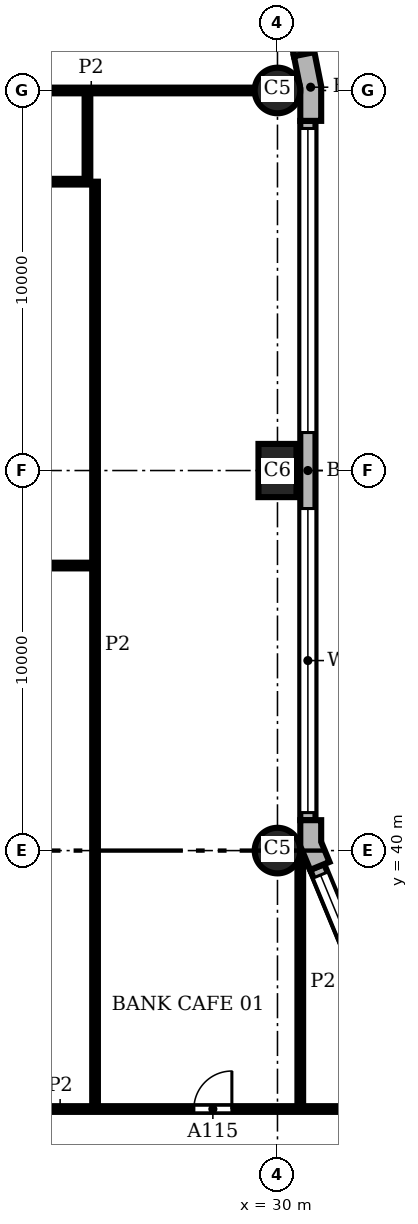
"""IFC4 building model, lengths in metres.
Left out: names, types, materials, properties, quantities, classifications, styles, units other than length and angle.
Written with IfcOpenShell. Run it as: python <this file> out.ifc"""

import sys

from ifc_helpers import new_model, si_unit, direction, frame, frame_2d, origin, origin_2d, place, context, subcontext, project, spatial, polyline, rectangle, circle, outline, extrude, element, fill, save


model = new_model("IFC4")
c1 = context("Model", 3, precision=1e-05, world=origin(), true_north=direction((0.0, 1.0)))
c2 = subcontext(c1, "Body", "Model", "MODEL_VIEW")
j1 = project(units=[si_unit("LENGTHUNIT", "METRE"), si_unit("PLANEANGLEUNIT", "RADIAN")], contexts=[c1])
p1 = place(None, origin())
s1 = spatial("IfcSite", under=j1, at=p1, CompositionType="ELEMENT")
p2 = place(p1, origin())
s2 = spatial("IfcBuilding", under=s1, at=p2, CompositionType="ELEMENT")
p3 = place(p2, frame((0.0, 0.0, 12.0)))
s3 = spatial("IfcBuildingStorey", under=s2, at=p3, CompositionType="ELEMENT", Elevation=12.0)
p4 = place(p3, frame((30.0, 40.0, 0.0), z_axis=(0.0, 0.0, 1.0), x_axis=(1.0, 0.0, 0.0)))
e1 = element("IfcColumn", 1, at=p4, inside=s3, PredefinedType="COLUMN", context=c2, shape_type="SweptSolid", body=[
    extrude(circle(Radius=0.6, at=origin_2d()), origin(), (0.0, 0.0, 1.0), 3.9),
])
p5 = place(p3, frame((30.0, 50.0, 0.0), z_axis=(0.0, 0.0, 1.0), x_axis=(0.0, 1.0, 0.0)))
e2 = element("IfcColumn", 2, at=p5, inside=s3, PredefinedType="COLUMN", context=c2, shape_type="SweptSolid", body=[
    extrude(rectangle(XDim=1.4, YDim=1.0, at=origin_2d()), origin(), (0.0, 0.0, 1.0), 3.9),
])
p6 = place(p3, frame((30.0, 60.0, 0.0), z_axis=(0.0, 0.0, 1.0), x_axis=(1.0, 0.0, 0.0)))
e3 = element("IfcColumn", 3, at=p6, inside=s3, PredefinedType="COLUMN", context=c2, shape_type="SweptSolid", body=[
    extrude(circle(Radius=0.6, at=origin_2d()), origin(), (0.0, 0.0, 1.0), 3.9),
])
p7 = place(p3, origin())
e4 = element("IfcWall", 4, at=p7, inside=s3, PredefinedType="SOLIDWALL", context=c2, shape_type="SweptSolid", body=[
    extrude(outline(polyline([(31.23, 39.644), (31.369, 39.701), (31.15, 40.229), (31.15, 40.8), (31.0, 40.8), (30.6, 40.8), (30.6, 40.119), (30.861, 39.49), (31.23, 39.644)])), origin(), (0.0, 0.0, 1.0), 3.9),
])
e5 = element("IfcWall", 5, at=p7, inside=s3, PredefinedType="SOLIDWALL", context=c2, shape_type="SweptSolid", body=[
    extrude(outline(polyline([(31.0, 59.2), (31.15, 59.2), (31.15, 60.113), (30.972, 61.009), (30.825, 60.98), (30.432, 60.902), (30.6, 60.059), (30.6, 59.2), (31.0, 59.2)])), origin(), (0.0, 0.0, 1.0), 3.9),
])
p8 = place(p3, frame((33.362, 33.974, 0.0), z_axis=(0.0, 0.0, 1.0), x_axis=(-0.382655745237, 0.923891000409, 0.0)))
e6 = element("IfcWall", 6, at=p8, inside=s3, PredefinedType="SOLIDWALL", context=c2, shape_type="SweptSolid", body=[
    extrude(rectangle(XDim=6.053, YDim=0.4, at=frame_2d((3.027, 0.0))), origin(), (0.0, 0.0, 1.0), 3.9),
])
p9 = place(p8, frame((0.227, 0.0, 0.9)))
e7 = element("IfcOpeningElement", 7, at=p9, cuts=e6, PredefinedType="OPENING", context=c2, shape_type="SweptSolid", body=[
    extrude(rectangle(XDim=5.6, YDim=2.35, at=frame_2d((2.8, 1.175))), frame((0.0, 0.21, 0.0), z_axis=(0.0, -1.0, 0.0), x_axis=(1.0, 0.0, 0.0)), (0.0, 0.0, 1.0), 0.42),
])
p10 = place(p3, frame((30.8, 40.8, 0.0), z_axis=(0.0, 0.0, 1.0), x_axis=(0.0, 1.0, 0.0)))
e8 = element("IfcWall", 8, at=p10, inside=s3, PredefinedType="SOLIDWALL", context=c2, shape_type="SweptSolid", body=[
    extrude(rectangle(XDim=18.4, YDim=0.4, at=frame_2d((9.2, 0.0))), origin(), (0.0, 0.0, 1.0), 3.9),
])
p11 = place(p10, frame((0.2, 0.0, 0.9)))
e9 = element("IfcOpeningElement", 9, at=p11, cuts=e8, PredefinedType="OPENING", context=c2, shape_type="SweptSolid", body=[
    extrude(rectangle(XDim=8.0, YDim=2.35, at=frame_2d((4.0, 1.175))), frame((0.0, 0.21, 0.0), z_axis=(0.0, -1.0, 0.0), x_axis=(1.0, 0.0, 0.0)), (0.0, 0.0, 1.0), 0.42),
])
p12 = place(p10, frame((10.2, 0.0, 0.9)))
e10 = element("IfcOpeningElement", 10, at=p12, cuts=e8, PredefinedType="OPENING", context=c2, shape_type="SweptSolid", body=[
    extrude(rectangle(XDim=8.0, YDim=2.35, at=frame_2d((4.0, 1.175))), frame((0.0, 0.21, 0.0), z_axis=(0.0, -1.0, 0.0), x_axis=(1.0, 0.0, 0.0)), (0.0, 0.0, 1.0), 0.42),
])
p13 = place(p3, frame((30.629, 60.941, 0.0), z_axis=(0.0, 0.0, 1.0), x_axis=(-0.195098533057, 0.98078364709, 0.0)))
e11 = element("IfcWall", 11, at=p13, inside=s3, PredefinedType="SOLIDWALL", context=c2, shape_type="SweptSolid", body=[
    extrude(rectangle(XDim=4.753, YDim=0.4, at=frame_2d((2.376, 0.0))), origin(), (0.0, 0.0, 1.0), 3.9),
])
p14 = place(p13, frame((0.226, 0.0, 0.9)))
e12 = element("IfcOpeningElement", 12, at=p14, cuts=e11, PredefinedType="OPENING", context=c2, shape_type="SweptSolid", body=[
    extrude(rectangle(XDim=4.3, YDim=2.35, at=frame_2d((2.15, 1.175))), frame((0.0, 0.21, 0.0), z_axis=(0.0, -1.0, 0.0), x_axis=(1.0, 0.0, 0.0)), (0.0, 0.0, 1.0), 0.42),
])
p15 = place(p3, frame((25.0, 57.6, 0.0), z_axis=(0.0, 0.0, 1.0), x_axis=(0.0, 1.0, 0.0)))
e13 = element("IfcWall", 13, at=p15, inside=s3, PredefinedType="PARTITIONING", context=c2, shape_type="SweptSolid", body=[
    extrude(rectangle(XDim=2.4, YDim=0.15, at=frame_2d((1.2, 0.0))), origin(), (0.0, 0.0, 1.0), 3.58),
])
p16 = place(p3, frame((25.2, 33.2, 0.0), z_axis=(0.0, 0.0, 1.0), x_axis=(0.0, 1.0, 0.0)))
e14 = element("IfcWall", 14, at=p16, inside=s3, PredefinedType="PARTITIONING", context=c2, shape_type="SweptSolid", body=[
    extrude(rectangle(XDim=24.4, YDim=0.15, at=frame_2d((12.2, 0.0))), origin(), (0.0, 0.0, 1.0), 3.58),
])
p17 = place(p3, frame((30.6, 33.2, 0.0), z_axis=(0.0, 0.0, 1.0), x_axis=(0.0, 1.0, 0.0)))
e15 = element("IfcWall", 15, at=p17, inside=s3, PredefinedType="PARTITIONING", context=c2, shape_type="SweptSolid", body=[
    extrude(rectangle(XDim=6.699, YDim=0.15, at=frame_2d((3.35, 0.0))), origin(), (0.0, 0.0, 1.0), 3.58),
])
p18 = place(p3, frame((16.2, 33.2, 0.0), z_axis=(0.0, 0.0, 1.0), x_axis=(1.0, 0.0, 0.0)))
e16 = element("IfcWall", 16, at=p18, inside=s3, PredefinedType="PARTITIONING", context=c2, shape_type="SweptSolid", body=[
    extrude(rectangle(XDim=16.162, YDim=0.15, at=frame_2d((8.081, 0.0))), origin(), (0.0, 0.0, 1.0), 3.58),
])
p19 = place(p18, frame((11.6, 0.0, 0.0)))
e17 = element("IfcOpeningElement", 17, at=p19, cuts=e16, PredefinedType="OPENING", context=c2, shape_type="SweptSolid", body=[
    extrude(rectangle(XDim=1.0, YDim=2.1, at=frame_2d((0.5, 1.05))), frame((0.0, 0.085, 0.0), z_axis=(0.0, -1.0, 0.0), x_axis=(1.0, 0.0, 0.0)), (0.0, 0.0, 1.0), 0.17),
])
p20 = place(p3, frame((16.2, 47.5, 0.0), z_axis=(0.0, 0.0, 1.0), x_axis=(1.0, 0.0, 0.0)))
e18 = element("IfcWall", 18, at=p20, inside=s3, PredefinedType="PARTITIONING", context=c2, shape_type="SweptSolid", body=[
    extrude(rectangle(XDim=9.0, YDim=0.15, at=frame_2d((4.5, 0.0))), origin(), (0.0, 0.0, 1.0), 3.58),
])
p21 = place(p3, frame((16.2, 57.6, 0.0), z_axis=(0.0, 0.0, 1.0), x_axis=(1.0, 0.0, 0.0)))
e19 = element("IfcWall", 19, at=p21, inside=s3, PredefinedType="PARTITIONING", context=c2, shape_type="SweptSolid", body=[
    extrude(rectangle(XDim=8.8, YDim=0.15, at=frame_2d((4.4, 0.0))), origin(), (0.0, 0.0, 1.0), 3.58),
])
p22 = place(p3, frame((20.8, 60.0, 0.0), z_axis=(0.0, 0.0, 1.0), x_axis=(1.0, 0.0, 0.0)))
e20 = element("IfcWall", 20, at=p22, inside=s3, PredefinedType="PARTITIONING", context=c2, shape_type="SweptSolid", body=[
    extrude(rectangle(XDim=8.6, YDim=0.15, at=frame_2d((4.3, 0.0))), origin(), (0.0, 0.0, 1.0), 3.58),
])
p23 = place(p9, origin())
e21 = element("IfcWindow", 21, at=p23, inside=s3, PartitioningType="SINGLE_PANEL", PredefinedType="WINDOW", context=c2, shape_type="SweptSolid", body=[
    extrude(rectangle(XDim=5.6, YDim=2.35, at=frame_2d((2.8, 1.175))), frame((0.0, 0.16, 0.0), z_axis=(0.0, -1.0, 0.0), x_axis=(1.0, 0.0, 0.0)), (0.0, 0.0, 1.0), 0.06),
])
fill(e7, e21)
p24 = place(p11, origin())
e22 = element("IfcWindow", 22, at=p24, inside=s3, PartitioningType="SINGLE_PANEL", PredefinedType="WINDOW", context=c2, shape_type="SweptSolid", body=[
    extrude(rectangle(XDim=8.0, YDim=2.35, at=frame_2d((4.0, 1.175))), frame((0.0, 0.16, 0.0), z_axis=(0.0, -1.0, 0.0), x_axis=(1.0, 0.0, 0.0)), (0.0, 0.0, 1.0), 0.06),
])
fill(e9, e22)
p25 = place(p12, origin())
e23 = element("IfcWindow", 23, at=p25, inside=s3, PartitioningType="SINGLE_PANEL", PredefinedType="WINDOW", context=c2, shape_type="SweptSolid", body=[
    extrude(rectangle(XDim=8.0, YDim=2.35, at=frame_2d((4.0, 1.175))), frame((0.0, 0.16, 0.0), z_axis=(0.0, -1.0, 0.0), x_axis=(1.0, 0.0, 0.0)), (0.0, 0.0, 1.0), 0.06),
])
fill(e10, e23)
p26 = place(p19, origin())
e24 = element("IfcDoor", 24, at=p26, inside=s3, OperationType="SINGLE_SWING_RIGHT", PredefinedType="DOOR", context=c2, shape_type="SweptSolid", body=[
    extrude(rectangle(XDim=1.0, YDim=2.1, at=frame_2d((0.5, 1.05))), frame((0.0, 0.025, 0.0), z_axis=(0.0, -1.0, 0.0), x_axis=(1.0, 0.0, 0.0)), (0.0, 0.0, 1.0), 0.05),
])
fill(e17, e24)
save(model, sys.argv[1])
